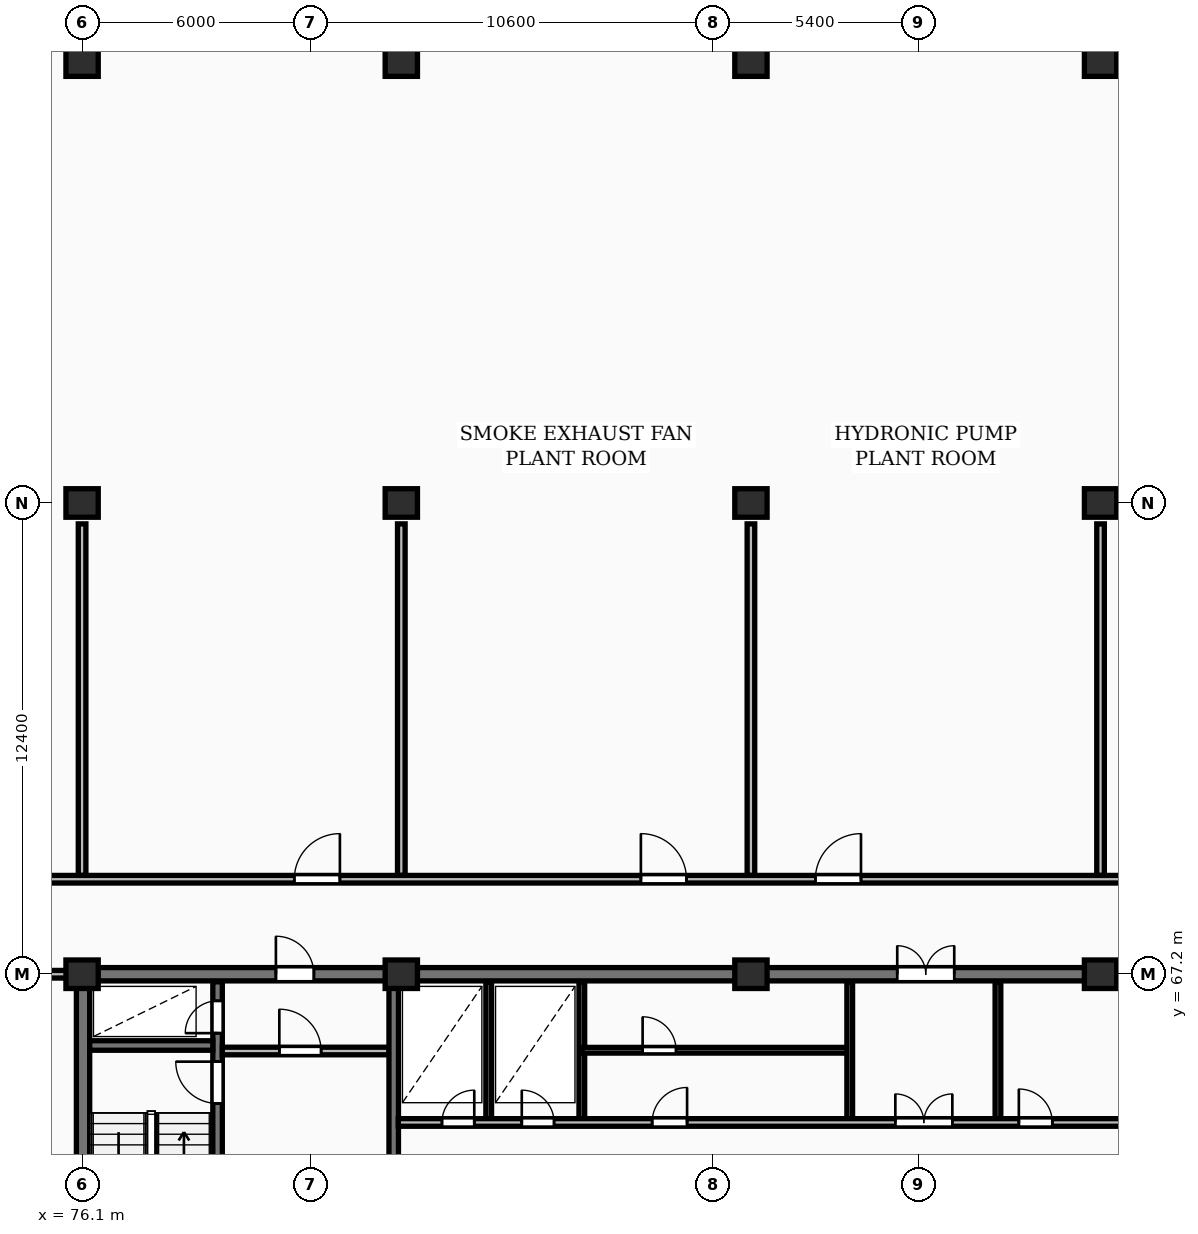
"""IFC4 building model, lengths in metres.
Left out: names, types, materials, properties, quantities, classifications, styles, units other than length and angle.
Written with IfcOpenShell. Run it as: python <this file> out.ifc"""

import sys

from ifc_helpers import new_model, si_unit, direction, frame, frame_2d, origin, origin_2d, place, context, subcontext, project, spatial, rectangle, extrude, element, fill, save


model = new_model("IFC4")
c1 = context("Model", 3, precision=1e-05, world=origin(), true_north=direction((0.0, 1.0)))
c2 = subcontext(c1, "Body", "Model", "MODEL_VIEW")
j1 = project(units=[si_unit("LENGTHUNIT", "METRE"), si_unit("PLANEANGLEUNIT", "RADIAN")], contexts=[c1])
p1 = place(None, origin())
s1 = spatial("IfcSite", under=j1, at=p1, CompositionType="ELEMENT")
p2 = place(p1, origin())
s2 = spatial("IfcBuilding", under=s1, at=p2, CompositionType="ELEMENT")
p3 = place(p2, frame((0.0, 0.0, 223.85)))
s3 = spatial("IfcBuildingStorey", under=s2, at=p3, CompositionType="ELEMENT", Elevation=223.85)
for number, where, z_axis, x_axis in (
    (1, (76.1, 67.2, 0.0), (0.0, 0.0, 1.0), (1.0, 0.0, 0.0)),
    (2, (76.1, 79.6, 0.0), (0.0, 0.0, 1.0), (1.0, 0.0, 0.0)),
    (3, (76.1, 91.2, 0.0), (0.0, 0.0, 1.0), (1.0, 0.0, 0.0)),
    (4, (84.5, 67.2, 0.0), (0.0, 0.0, 1.0), (1.0, 0.0, 0.0)),
    (5, (84.5, 79.6, 0.0), (0.0, 0.0, 1.0), (1.0, 0.0, 0.0)),
    (6, (84.5, 91.2, 0.0), (0.0, 0.0, 1.0), (1.0, 0.0, 0.0)),
    (7, (93.7, 67.2, 0.0), (0.0, 0.0, 1.0), (1.0, 0.0, 0.0)),
    (8, (93.7, 79.6, 0.0), (0.0, 0.0, 1.0), (1.0, 0.0, 0.0)),
    (9, (93.7, 91.2, 0.0), (0.0, 0.0, 1.0), (1.0, 0.0, 0.0)),
    (10, (102.9, 67.2, 0.0), (0.0, 0.0, 1.0), (1.0, 0.0, 0.0)),
    (11, (102.9, 79.6, 0.0), (0.0, 0.0, 1.0), (1.0, 0.0, 0.0)),
    (12, (102.9, 91.2, 0.0), (0.0, 0.0, 1.0), (1.0, 0.0, 0.0)),
):
    element("IfcColumn", number, at=place(p3, frame(where, z_axis=z_axis, x_axis=x_axis)), inside=s3, PredefinedType="COLUMN", context=c2, shape_type="SweptSolid", body=[
        extrude(rectangle(XDim=0.85, YDim=0.75, at=origin_2d()), origin(), (0.0, 0.0, 1.0), 4.8),
    ])
p4 = place(p3, frame((76.125, 55.375, 0.0), z_axis=(0.0, 0.0, 1.0), x_axis=(0.0, 1.0, 0.0)))
e13 = element("IfcWall", 13, at=p4, inside=s3, PredefinedType="SHEAR", context=c2, shape_type="SweptSolid", body=[
    extrude(rectangle(XDim=11.65, YDim=0.35, at=frame_2d((5.825, 0.0))), origin(), (0.0, 0.0, 1.0), 4.8),
])
p5 = place(p3, frame((75.95, 67.2, 0.0), z_axis=(0.0, 0.0, 1.0), x_axis=(1.0, 0.0, 0.0)))
e14 = element("IfcWall", 14, at=p5, inside=s3, PredefinedType="SHEAR", context=c2, shape_type="SweptSolid", body=[
    extrude(rectangle(XDim=36.3, YDim=0.35, at=frame_2d((18.15, 0.0))), origin(), (0.0, 0.0, 1.0), 4.8),
])
p6 = place(p5, frame((5.25, 0.0, 0.0)))
e15 = element("IfcOpeningElement", 15, at=p6, cuts=e14, PredefinedType="OPENING", context=c2, shape_type="SweptSolid", body=[
    extrude(rectangle(XDim=1.0, YDim=2.15, at=frame_2d((0.5, 1.075))), frame((0.0, 0.185, 0.0), z_axis=(0.0, -1.0, 0.0), x_axis=(1.0, 0.0, 0.0)), (0.0, 0.0, 1.0), 0.37),
])
p7 = place(p5, frame((21.6, 0.0, 0.0)))
e16 = element("IfcOpeningElement", 16, at=p7, cuts=e14, PredefinedType="OPENING", context=c2, shape_type="SweptSolid", body=[
    extrude(rectangle(XDim=1.5, YDim=2.2, at=frame_2d((0.75, 1.1))), frame((0.0, 0.185, 0.0), z_axis=(0.0, -1.0, 0.0), x_axis=(1.0, 0.0, 0.0)), (0.0, 0.0, 1.0), 0.37),
])
p8 = place(p5, frame((30.45, 0.0, 0.0)))
e17 = element("IfcOpeningElement", 17, at=p8, cuts=e14, PredefinedType="OPENING", context=c2, shape_type="SweptSolid", body=[
    extrude(rectangle(XDim=1.0, YDim=2.15, at=frame_2d((0.5, 1.075))), frame((0.0, 0.185, 0.0), z_axis=(0.0, -1.0, 0.0), x_axis=(1.0, 0.0, 0.0)), (0.0, 0.0, 1.0), 0.37),
])
p9 = place(p3, frame((79.665, 55.4, 0.0), z_axis=(0.0, 0.0, 1.0), x_axis=(0.0, 1.0, 0.0)))
e18 = element("IfcWall", 18, at=p9, inside=s3, PredefinedType="SHEAR", context=c2, shape_type="SweptSolid", body=[
    extrude(rectangle(XDim=11.6, YDim=0.25, at=frame_2d((5.8, 0.0))), origin(), (0.0, 0.0, 1.0), 4.8),
])
p10 = place(p9, frame((0.55, 0.0, 0.0)))
e19 = element("IfcOpeningElement", 19, at=p10, cuts=e18, PredefinedType="OPENING", context=c2, shape_type="SweptSolid", body=[
    extrude(rectangle(XDim=0.85, YDim=2.05, at=frame_2d((0.425, 1.025))), frame((0.0, 0.135, 0.0), z_axis=(0.0, -1.0, 0.0), x_axis=(1.0, 0.0, 0.0)), (0.0, 0.0, 1.0), 0.27),
])
p11 = place(p9, frame((8.4, 0.0, 0.0)))
e20 = element("IfcOpeningElement", 20, at=p11, cuts=e18, PredefinedType="OPENING", context=c2, shape_type="SweptSolid", body=[
    extrude(rectangle(XDim=1.1, YDim=2.1, at=frame_2d((0.55, 1.05))), frame((0.0, 0.135, 0.0), z_axis=(0.0, -1.0, 0.0), x_axis=(1.0, 0.0, 0.0)), (0.0, 0.0, 1.0), 0.27),
])
p12 = place(p9, frame((10.25, 0.0, 0.0)))
e21 = element("IfcOpeningElement", 21, at=p12, cuts=e18, PredefinedType="OPENING", context=c2, shape_type="SweptSolid", body=[
    extrude(rectangle(XDim=0.85, YDim=2.05, at=frame_2d((0.425, 1.025))), frame((0.0, 0.135, 0.0), z_axis=(0.0, -1.0, 0.0), x_axis=(1.0, 0.0, 0.0)), (0.0, 0.0, 1.0), 0.27),
])
p13 = place(p3, frame((76.3, 65.325, 0.0), z_axis=(0.0, 0.0, 1.0), x_axis=(1.0, 0.0, 0.0)))
e22 = element("IfcWall", 22, at=p13, inside=s3, PredefinedType="SHEAR", context=c2, shape_type="SweptSolid", body=[
    extrude(rectangle(XDim=3.24, YDim=0.25, at=frame_2d((1.62, 0.0))), origin(), (0.0, 0.0, 1.0), 4.8),
])
p14 = place(p3, frame((79.79, 65.18, 0.0), z_axis=(0.0, 0.0, 1.0), x_axis=(1.0, 0.0, 0.0)))
e23 = element("IfcWall", 23, at=p14, inside=s3, PredefinedType="PARTITIONING", context=c2, shape_type="SweptSolid", body=[
    extrude(rectangle(XDim=4.39, YDim=0.2, at=frame_2d((2.195, 0.0))), origin(), (0.0, 0.0, 1.0), 4.48),
])
p15 = place(p14, frame((1.5, 0.0, 0.0)))
e24 = element("IfcOpeningElement", 24, at=p15, cuts=e23, PredefinedType="OPENING", context=c2, shape_type="SweptSolid", body=[
    extrude(rectangle(XDim=1.1, YDim=2.1, at=frame_2d((0.55, 1.05))), frame((0.0, 0.11, 0.0), z_axis=(0.0, -1.0, 0.0), x_axis=(1.0, 0.0, 0.0)), (0.0, 0.0, 1.0), 0.22),
])
p16 = place(p3, frame((84.3, 55.4, 0.0), z_axis=(0.0, 0.0, 1.0), x_axis=(0.0, 1.0, 0.0)))
e25 = element("IfcWall", 25, at=p16, inside=s3, PredefinedType="SHEAR", context=c2, shape_type="SweptSolid", body=[
    extrude(rectangle(XDim=11.6, YDim=0.25, at=frame_2d((5.8, 0.0))), origin(), (0.0, 0.0, 1.0), 4.8),
])
p17 = place(p16, frame((5.2, 0.0, 0.0)))
e26 = element("IfcOpeningElement", 26, at=p17, cuts=e25, PredefinedType="OPENING", context=c2, shape_type="SweptSolid", body=[
    extrude(rectangle(XDim=1.1, YDim=2.1, at=frame_2d((0.55, 1.05))), frame((0.0, 0.135, 0.0), z_axis=(0.0, -1.0, 0.0), x_axis=(1.0, 0.0, 0.0)), (0.0, 0.0, 1.0), 0.27),
])
for number, where, z_axis, x_axis in (
    (27, (86.8, 63.4, 0.0), (0.0, 0.0, 1.0), (0.0, 1.0, 0.0)),
    (28, (89.25, 63.4, 0.0), (0.0, 0.0, 1.0), (0.0, 1.0, 0.0)),
):
    element("IfcWall", number, at=place(p3, frame(where, z_axis=z_axis, x_axis=x_axis)), inside=s3, PredefinedType="PARTITIONING", context=c2, shape_type="SweptSolid", body=[
        extrude(rectangle(XDim=3.6, YDim=0.15, at=frame_2d((1.8, 0.0))), origin(), (0.0, 0.0, 1.0), 4.48),
    ])
p18 = place(p3, frame((89.25, 65.2, 0.0), z_axis=(0.0, 0.0, 1.0), x_axis=(1.0, 0.0, 0.0)))
e29 = element("IfcWall", 29, at=p18, inside=s3, PredefinedType="PARTITIONING", context=c2, shape_type="SweptSolid", body=[
    extrude(rectangle(XDim=7.05, YDim=0.15, at=frame_2d((3.525, 0.0))), origin(), (0.0, 0.0, 1.0), 4.48),
])
p19 = place(p18, frame((1.6, 0.0, 0.0)))
e30 = element("IfcOpeningElement", 30, at=p19, cuts=e29, PredefinedType="OPENING", context=c2, shape_type="SweptSolid", body=[
    extrude(rectangle(XDim=0.88, YDim=2.06, at=frame_2d((0.44, 1.03))), frame((0.0, 0.085, 0.0), z_axis=(0.0, -1.0, 0.0), x_axis=(1.0, 0.0, 0.0)), (0.0, 0.0, 1.0), 0.17),
])
for number, where, z_axis, x_axis in (
    (31, (96.3, 63.4, 0.0), (0.0, 0.0, 1.0), (0.0, 1.0, 0.0)),
    (32, (100.2, 63.4, 0.0), (0.0, 0.0, 1.0), (0.0, 1.0, 0.0)),
):
    element("IfcWall", number, at=place(p3, frame(where, z_axis=z_axis, x_axis=x_axis)), inside=s3, PredefinedType="PARTITIONING", context=c2, shape_type="SweptSolid", body=[
        extrude(rectangle(XDim=3.6, YDim=0.15, at=frame_2d((1.8, 0.0))), origin(), (0.0, 0.0, 1.0), 4.48),
    ])
p20 = place(p3, frame((84.42, 63.3, 0.0), z_axis=(0.0, 0.0, 1.0), x_axis=(1.0, 0.0, 0.0)))
e33 = element("IfcWall", 33, at=p20, inside=s3, PredefinedType="PARTITIONING", context=c2, shape_type="SweptSolid", body=[
    extrude(rectangle(XDim=19.83, YDim=0.2, at=frame_2d((9.915, 0.0))), origin(), (0.0, 0.0, 1.0), 4.48),
])
p21 = place(p20, frame((1.15, 0.0, 0.0)))
e34 = element("IfcOpeningElement", 34, at=p21, cuts=e33, PredefinedType="OPENING", context=c2, shape_type="SweptSolid", body=[
    extrude(rectangle(XDim=0.85, YDim=2.05, at=frame_2d((0.425, 1.025))), frame((0.0, 0.11, 0.0), z_axis=(0.0, -1.0, 0.0), x_axis=(1.0, 0.0, 0.0)), (0.0, 0.0, 1.0), 0.22),
])
p22 = place(p20, frame((3.25, 0.0, 0.0)))
e35 = element("IfcOpeningElement", 35, at=p22, cuts=e33, PredefinedType="OPENING", context=c2, shape_type="SweptSolid", body=[
    extrude(rectangle(XDim=0.85, YDim=2.05, at=frame_2d((0.425, 1.025))), frame((0.0, 0.11, 0.0), z_axis=(0.0, -1.0, 0.0), x_axis=(1.0, 0.0, 0.0)), (0.0, 0.0, 1.0), 0.22),
])
p23 = place(p20, frame((13.08, 0.0, 0.0)))
e36 = element("IfcOpeningElement", 36, at=p23, cuts=e33, PredefinedType="OPENING", context=c2, shape_type="SweptSolid", body=[
    extrude(rectangle(XDim=1.5, YDim=2.2, at=frame_2d((0.75, 1.1))), frame((0.0, 0.11, 0.0), z_axis=(0.0, -1.0, 0.0), x_axis=(1.0, 0.0, 0.0)), (0.0, 0.0, 1.0), 0.22),
])
p24 = place(p20, frame((6.68, 0.0, 0.0)))
e37 = element("IfcOpeningElement", 37, at=p24, cuts=e33, PredefinedType="OPENING", context=c2, shape_type="SweptSolid", body=[
    extrude(rectangle(XDim=0.92, YDim=2.08, at=frame_2d((0.46, 1.04))), frame((0.0, 0.11, 0.0), z_axis=(0.0, -1.0, 0.0), x_axis=(1.0, 0.0, 0.0)), (0.0, 0.0, 1.0), 0.22),
])
p25 = place(p20, frame((16.33, 0.0, 0.0)))
e38 = element("IfcOpeningElement", 38, at=p25, cuts=e33, PredefinedType="OPENING", context=c2, shape_type="SweptSolid", body=[
    extrude(rectangle(XDim=0.88, YDim=2.06, at=frame_2d((0.44, 1.03))), frame((0.0, 0.11, 0.0), z_axis=(0.0, -1.0, 0.0), x_axis=(1.0, 0.0, 0.0)), (0.0, 0.0, 1.0), 0.22),
])
for number, where, z_axis, x_axis in (
    (39, (76.1, 69.8, 0.0), (0.0, 0.0, 1.0), (0.0, 1.0, 0.0)),
    (40, (84.5, 69.8, 0.0), (0.0, 0.0, 1.0), (0.0, 1.0, 0.0)),
    (41, (93.7, 69.8, 0.0), (0.0, 0.0, 1.0), (0.0, 1.0, 0.0)),
    (42, (102.9, 69.8, 0.0), (0.0, 0.0, 1.0), (0.0, 1.0, 0.0)),
):
    element("IfcWall", number, at=place(p3, frame(where, z_axis=z_axis, x_axis=x_axis)), inside=s3, PredefinedType="PARTITIONING", context=c2, shape_type="SweptSolid", body=[
        extrude(rectangle(XDim=9.25, YDim=0.2, at=frame_2d((4.625, 0.0))), origin(), (0.0, 0.0, 1.0), 3.23),
    ])
p26 = place(p3, frame((59.8, 69.7, 0.0), z_axis=(0.0, 0.0, 1.0), x_axis=(1.0, 0.0, 0.0)))
e43 = element("IfcWall", 43, at=p26, inside=s3, PredefinedType="PARTITIONING", context=c2, shape_type="SweptSolid", body=[
    extrude(rectangle(XDim=68.6, YDim=0.2, at=frame_2d((34.3, 0.0))), origin(), (0.0, 0.0, 1.0), 4.48),
])
p27 = place(p26, frame((5.372, 0.0, 0.0)))
e44 = element("IfcOpeningElement", 44, at=p27, cuts=e43, PredefinedType="OPENING", context=c2, shape_type="SweptSolid", body=[
    extrude(rectangle(XDim=1.2, YDim=2.15, at=frame_2d((0.6, 1.075))), frame((0.0, 0.11, 0.0), z_axis=(0.0, -1.0, 0.0), x_axis=(1.0, 0.0, 0.0)), (0.0, 0.0, 1.0), 0.22),
])
p28 = place(p26, frame((13.421, 0.0, 0.0)))
e45 = element("IfcOpeningElement", 45, at=p28, cuts=e43, PredefinedType="OPENING", context=c2, shape_type="SweptSolid", body=[
    extrude(rectangle(XDim=1.2, YDim=2.15, at=frame_2d((0.6, 1.075))), frame((0.0, 0.11, 0.0), z_axis=(0.0, -1.0, 0.0), x_axis=(1.0, 0.0, 0.0)), (0.0, 0.0, 1.0), 0.22),
])
p29 = place(p26, frame((21.884, 0.0, 0.0)))
e46 = element("IfcOpeningElement", 46, at=p29, cuts=e43, PredefinedType="OPENING", context=c2, shape_type="SweptSolid", body=[
    extrude(rectangle(XDim=1.2, YDim=2.15, at=frame_2d((0.6, 1.075))), frame((0.0, 0.11, 0.0), z_axis=(0.0, -1.0, 0.0), x_axis=(1.0, 0.0, 0.0)), (0.0, 0.0, 1.0), 0.22),
])
p30 = place(p26, frame((31.004, 0.0, 0.0)))
e47 = element("IfcOpeningElement", 47, at=p30, cuts=e43, PredefinedType="OPENING", context=c2, shape_type="SweptSolid", body=[
    extrude(rectangle(XDim=1.2, YDim=2.15, at=frame_2d((0.6, 1.075))), frame((0.0, 0.11, 0.0), z_axis=(0.0, -1.0, 0.0), x_axis=(1.0, 0.0, 0.0)), (0.0, 0.0, 1.0), 0.22),
])
p31 = place(p26, frame((35.596, 0.0, 0.0)))
e48 = element("IfcOpeningElement", 48, at=p31, cuts=e43, PredefinedType="OPENING", context=c2, shape_type="SweptSolid", body=[
    extrude(rectangle(XDim=1.2, YDim=2.15, at=frame_2d((0.6, 1.075))), frame((0.0, 0.11, 0.0), z_axis=(0.0, -1.0, 0.0), x_axis=(1.0, 0.0, 0.0)), (0.0, 0.0, 1.0), 0.22),
])
p32 = place(p26, frame((44.796, 0.0, 0.0)))
e49 = element("IfcOpeningElement", 49, at=p32, cuts=e43, PredefinedType="OPENING", context=c2, shape_type="SweptSolid", body=[
    extrude(rectangle(XDim=1.2, YDim=2.15, at=frame_2d((0.6, 1.075))), frame((0.0, 0.11, 0.0), z_axis=(0.0, -1.0, 0.0), x_axis=(1.0, 0.0, 0.0)), (0.0, 0.0, 1.0), 0.22),
])
p33 = place(p26, frame((53.991, 0.0, 0.0)))
e50 = element("IfcOpeningElement", 50, at=p33, cuts=e43, PredefinedType="OPENING", context=c2, shape_type="SweptSolid", body=[
    extrude(rectangle(XDim=1.2, YDim=2.15, at=frame_2d((0.6, 1.075))), frame((0.0, 0.11, 0.0), z_axis=(0.0, -1.0, 0.0), x_axis=(1.0, 0.0, 0.0)), (0.0, 0.0, 1.0), 0.22),
])
p34 = place(p26, frame((62.182, 0.0, 0.0)))
e51 = element("IfcOpeningElement", 51, at=p34, cuts=e43, PredefinedType="OPENING", context=c2, shape_type="SweptSolid", body=[
    extrude(rectangle(XDim=1.5, YDim=2.18, at=frame_2d((0.75, 1.09))), frame((0.0, 0.11, 0.0), z_axis=(0.0, -1.0, 0.0), x_axis=(1.0, 0.0, 0.0)), (0.0, 0.0, 1.0), 0.22),
])
p35 = place(p3, frame((59.85, 67.2, 0.0), z_axis=(0.0, 0.0, 1.0), x_axis=(1.0, 0.0, 0.0)))
e52 = element("IfcWall", 52, at=p35, inside=s3, PredefinedType="PARTITIONING", context=c2, shape_type="SweptSolid", body=[
    extrude(rectangle(XDim=16.1, YDim=0.2, at=frame_2d((8.05, 0.0))), origin(), (0.0, 0.0, 1.0), 3.23),
])
p36 = place(p35, frame((5.36, 0.0, 0.0)))
e53 = element("IfcOpeningElement", 53, at=p36, cuts=e52, PredefinedType="OPENING", context=c2, shape_type="SweptSolid", body=[
    extrude(rectangle(XDim=1.1, YDim=2.1, at=frame_2d((0.55, 1.05))), frame((0.0, 0.11, 0.0), z_axis=(0.0, -1.0, 0.0), x_axis=(1.0, 0.0, 0.0)), (0.0, 0.0, 1.0), 0.22),
])
p37 = place(p35, frame((9.77, 0.0, 0.0)))
e54 = element("IfcOpeningElement", 54, at=p37, cuts=e52, PredefinedType="OPENING", context=c2, shape_type="SweptSolid", body=[
    extrude(rectangle(XDim=1.1, YDim=2.1, at=frame_2d((0.55, 1.05))), frame((0.0, 0.11, 0.0), z_axis=(0.0, -1.0, 0.0), x_axis=(1.0, 0.0, 0.0)), (0.0, 0.0, 1.0), 0.22),
])
p38 = place(p6, origin())
e55 = element("IfcDoor", 55, at=p38, inside=s3, OperationType="SINGLE_SWING_LEFT", PredefinedType="DOOR", context=c2, shape_type="SweptSolid", body=[
    extrude(rectangle(XDim=1.0, YDim=2.15, at=frame_2d((0.5, 1.075))), frame((0.0, 0.025, 0.0), z_axis=(0.0, -1.0, 0.0), x_axis=(1.0, 0.0, 0.0)), (0.0, 0.0, 1.0), 0.05),
])
fill(e15, e55)
p39 = place(p7, origin())
e56 = element("IfcDoor", 56, at=p39, inside=s3, OperationType="DOUBLE_DOOR_SINGLE_SWING", PredefinedType="DOOR", context=c2, shape_type="SweptSolid", body=[
    extrude(rectangle(XDim=1.5, YDim=2.2, at=frame_2d((0.75, 1.1))), frame((0.0, 0.025, 0.0), z_axis=(0.0, -1.0, 0.0), x_axis=(1.0, 0.0, 0.0)), (0.0, 0.0, 1.0), 0.05),
])
fill(e16, e56)
p40 = place(p11, origin())
e57 = element("IfcDoor", 57, at=p40, inside=s3, OperationType="SINGLE_SWING_RIGHT", PredefinedType="DOOR", context=c2, shape_type="SweptSolid", body=[
    extrude(rectangle(XDim=1.1, YDim=2.1, at=frame_2d((0.55, 1.05))), frame((0.0, 0.025, 0.0), z_axis=(0.0, -1.0, 0.0), x_axis=(1.0, 0.0, 0.0)), (0.0, 0.0, 1.0), 0.05),
])
fill(e20, e57)
p41 = place(p12, origin())
e58 = element("IfcDoor", 58, at=p41, inside=s3, OperationType="SINGLE_SWING_LEFT", PredefinedType="DOOR", context=c2, shape_type="SweptSolid", body=[
    extrude(rectangle(XDim=0.85, YDim=2.05, at=frame_2d((0.425, 1.025))), frame((0.0, 0.025, 0.0), z_axis=(0.0, -1.0, 0.0), x_axis=(1.0, 0.0, 0.0)), (0.0, 0.0, 1.0), 0.05),
])
fill(e21, e58)
p42 = place(p15, origin())
e59 = element("IfcDoor", 59, at=p42, inside=s3, OperationType="SINGLE_SWING_LEFT", PredefinedType="DOOR", context=c2, shape_type="SweptSolid", body=[
    extrude(rectangle(XDim=1.1, YDim=2.1, at=frame_2d((0.55, 1.05))), frame((0.0, 0.025, 0.0), z_axis=(0.0, -1.0, 0.0), x_axis=(1.0, 0.0, 0.0)), (0.0, 0.0, 1.0), 0.05),
])
fill(e24, e59)
p43 = place(p19, origin())
e60 = element("IfcDoor", 60, at=p43, inside=s3, OperationType="SINGLE_SWING_LEFT", PredefinedType="DOOR", context=c2, shape_type="SweptSolid", body=[
    extrude(rectangle(XDim=0.88, YDim=2.06, at=frame_2d((0.44, 1.03))), frame((0.0, 0.025, 0.0), z_axis=(0.0, -1.0, 0.0), x_axis=(1.0, 0.0, 0.0)), (0.0, 0.0, 1.0), 0.05),
])
fill(e30, e60)
p44 = place(p21, origin())
e61 = element("IfcDoor", 61, at=p44, inside=s3, OperationType="SINGLE_SWING_RIGHT", PredefinedType="DOOR", context=c2, shape_type="SweptSolid", body=[
    extrude(rectangle(XDim=0.85, YDim=2.05, at=frame_2d((0.425, 1.025))), frame((0.0, 0.025, 0.0), z_axis=(0.0, -1.0, 0.0), x_axis=(1.0, 0.0, 0.0)), (0.0, 0.0, 1.0), 0.05),
])
fill(e34, e61)
p45 = place(p22, origin())
e62 = element("IfcDoor", 62, at=p45, inside=s3, OperationType="SINGLE_SWING_LEFT", PredefinedType="DOOR", context=c2, shape_type="SweptSolid", body=[
    extrude(rectangle(XDim=0.85, YDim=2.05, at=frame_2d((0.425, 1.025))), frame((0.0, 0.025, 0.0), z_axis=(0.0, -1.0, 0.0), x_axis=(1.0, 0.0, 0.0)), (0.0, 0.0, 1.0), 0.05),
])
fill(e35, e62)
p46 = place(p23, origin())
e63 = element("IfcDoor", 63, at=p46, inside=s3, OperationType="DOUBLE_DOOR_SINGLE_SWING", PredefinedType="DOOR", context=c2, shape_type="SweptSolid", body=[
    extrude(rectangle(XDim=1.5, YDim=2.2, at=frame_2d((0.75, 1.1))), frame((0.0, 0.025, 0.0), z_axis=(0.0, -1.0, 0.0), x_axis=(1.0, 0.0, 0.0)), (0.0, 0.0, 1.0), 0.05),
])
fill(e36, e63)
p47 = place(p24, origin())
e64 = element("IfcDoor", 64, at=p47, inside=s3, OperationType="SINGLE_SWING_RIGHT", PredefinedType="DOOR", context=c2, shape_type="SweptSolid", body=[
    extrude(rectangle(XDim=0.92, YDim=2.08, at=frame_2d((0.46, 1.04))), frame((0.0, 0.025, 0.0), z_axis=(0.0, -1.0, 0.0), x_axis=(1.0, 0.0, 0.0)), (0.0, 0.0, 1.0), 0.05),
])
fill(e37, e64)
p48 = place(p25, origin())
e65 = element("IfcDoor", 65, at=p48, inside=s3, OperationType="SINGLE_SWING_LEFT", PredefinedType="DOOR", context=c2, shape_type="SweptSolid", body=[
    extrude(rectangle(XDim=0.88, YDim=2.06, at=frame_2d((0.44, 1.03))), frame((0.0, 0.025, 0.0), z_axis=(0.0, -1.0, 0.0), x_axis=(1.0, 0.0, 0.0)), (0.0, 0.0, 1.0), 0.05),
])
fill(e38, e65)
p49 = place(p29, origin())
e66 = element("IfcDoor", 66, at=p49, inside=s3, OperationType="SINGLE_SWING_RIGHT", PredefinedType="DOOR", context=c2, shape_type="SweptSolid", body=[
    extrude(rectangle(XDim=1.2, YDim=2.15, at=frame_2d((0.6, 1.075))), frame((0.0, 0.025, 0.0), z_axis=(0.0, -1.0, 0.0), x_axis=(1.0, 0.0, 0.0)), (0.0, 0.0, 1.0), 0.05),
])
fill(e46, e66)
p50 = place(p30, origin())
e67 = element("IfcDoor", 67, at=p50, inside=s3, OperationType="SINGLE_SWING_LEFT", PredefinedType="DOOR", context=c2, shape_type="SweptSolid", body=[
    extrude(rectangle(XDim=1.2, YDim=2.15, at=frame_2d((0.6, 1.075))), frame((0.0, 0.025, 0.0), z_axis=(0.0, -1.0, 0.0), x_axis=(1.0, 0.0, 0.0)), (0.0, 0.0, 1.0), 0.05),
])
fill(e47, e67)
p51 = place(p31, origin())
e68 = element("IfcDoor", 68, at=p51, inside=s3, OperationType="SINGLE_SWING_RIGHT", PredefinedType="DOOR", context=c2, shape_type="SweptSolid", body=[
    extrude(rectangle(XDim=1.2, YDim=2.15, at=frame_2d((0.6, 1.075))), frame((0.0, 0.025, 0.0), z_axis=(0.0, -1.0, 0.0), x_axis=(1.0, 0.0, 0.0)), (0.0, 0.0, 1.0), 0.05),
])
fill(e48, e68)
save(model, sys.argv[1])
